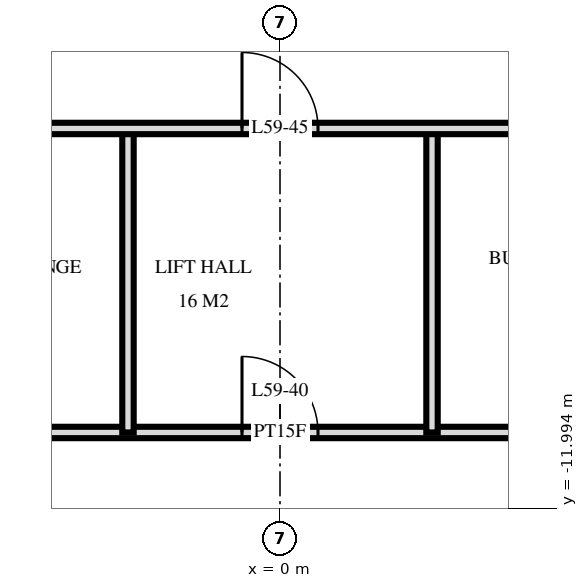
"""IFC4 building model, lengths in metres.
Left out: names, types, materials, properties, quantities, classifications, styles, units other than length and angle.
Written with IfcOpenShell. Run it as: python <this file> out.ifc"""

import sys

from ifc_helpers import new_model, si_unit, direction, frame, frame_2d, origin, place, context, subcontext, project, spatial, rectangle, extrude, element, fill, save


model = new_model("IFC4")
c1 = context("Model", 3, precision=1e-05, world=origin(), true_north=direction((0.0, 1.0)))
c2 = subcontext(c1, "Body", "Model", "MODEL_VIEW")
j1 = project(units=[si_unit("LENGTHUNIT", "METRE"), si_unit("PLANEANGLEUNIT", "RADIAN")], contexts=[c1])
p1 = place(None, origin())
s1 = spatial("IfcSite", under=j1, at=p1, CompositionType="ELEMENT")
p2 = place(p1, origin())
s2 = spatial("IfcBuilding", under=s1, at=p2, CompositionType="ELEMENT")
p3 = place(p2, frame((0.0, 0.0, 225.6)))
s3 = spatial("IfcBuildingStorey", under=s2, at=p3, CompositionType="ELEMENT", Elevation=225.6)
for number, where, z_axis, x_axis in (
    (1, (2.0, -11.0, 0.0), (0.0, 0.0, 1.0), (0.0, 1.0, 0.0)),
    (2, (-2.0, -11.0, 0.0), (0.0, 0.0, 1.0), (0.0, 1.0, 0.0)),
):
    element("IfcWall", number, at=place(p3, frame(where, z_axis=z_axis, x_axis=x_axis)), inside=s3, PredefinedType="PARTITIONING", context=c2, shape_type="SweptSolid", body=[
        extrude(rectangle(XDim=4.0, YDim=0.15, at=frame_2d((2.0, 0.0))), origin(), (0.0, 0.0, 1.0), 3.22),
    ])
p4 = place(p3, frame((-9.95, -11.0, 0.0), z_axis=(0.0, 0.0, 1.0), x_axis=(1.0, 0.0, 0.0)))
e3 = element("IfcWall", 3, at=p4, inside=s3, PredefinedType="PARTITIONING", context=c2, shape_type="SweptSolid", body=[
    extrude(rectangle(XDim=19.9, YDim=0.15, at=frame_2d((9.95, 0.0))), origin(), (0.0, 0.0, 1.0), 3.22),
])
p5 = place(p4, frame((9.45, 0.0, 0.0)))
e4 = element("IfcOpeningElement", 4, at=p5, cuts=e3, PredefinedType="OPENING", context=c2, shape_type="SweptSolid", body=[
    extrude(rectangle(XDim=1.0, YDim=2.1, at=frame_2d((0.5, 1.05))), frame((0.0, 0.085, 0.0), z_axis=(0.0, -1.0, 0.0), x_axis=(1.0, 0.0, 0.0)), (0.0, 0.0, 1.0), 0.17),
])
p6 = place(p4, frame((15.45, 0.0, 0.0)))
e5 = element("IfcOpeningElement", 5, at=p6, cuts=e3, PredefinedType="OPENING", context=c2, shape_type="SweptSolid", body=[
    extrude(rectangle(XDim=1.0, YDim=2.1, at=frame_2d((0.5, 1.05))), frame((0.0, 0.085, 0.0), z_axis=(0.0, -1.0, 0.0), x_axis=(1.0, 0.0, 0.0)), (0.0, 0.0, 1.0), 0.17),
])
p7 = place(p3, frame((-9.95, -7.0, 0.0), z_axis=(0.0, 0.0, 1.0), x_axis=(1.0, 0.0, 0.0)))
e6 = element("IfcWall", 6, at=p7, inside=s3, PredefinedType="PARTITIONING", context=c2, shape_type="SweptSolid", body=[
    extrude(rectangle(XDim=19.9, YDim=0.15, at=frame_2d((9.95, 0.0))), origin(), (0.0, 0.0, 1.0), 3.22),
])
p8 = place(p7, frame((9.45, 0.0, 0.0)))
e7 = element("IfcOpeningElement", 7, at=p8, cuts=e6, PredefinedType="OPENING", context=c2, shape_type="SweptSolid", body=[
    extrude(rectangle(XDim=1.0, YDim=2.1, at=frame_2d((0.5, 1.05))), frame((0.0, 0.085, 0.0), z_axis=(0.0, -1.0, 0.0), x_axis=(1.0, 0.0, 0.0)), (0.0, 0.0, 1.0), 0.17),
])
p9 = place(p7, frame((3.45, 0.0, 0.0)))
e8 = element("IfcOpeningElement", 8, at=p9, cuts=e6, PredefinedType="OPENING", context=c2, shape_type="SweptSolid", body=[
    extrude(rectangle(XDim=1.0, YDim=2.1, at=frame_2d((0.5, 1.05))), frame((0.0, 0.085, 0.0), z_axis=(0.0, -1.0, 0.0), x_axis=(1.0, 0.0, 0.0)), (0.0, 0.0, 1.0), 0.17),
])
p10 = place(p5, origin())
e9 = element("IfcDoor", 9, at=p10, inside=s3, OperationType="SINGLE_SWING_RIGHT", PredefinedType="DOOR", context=c2, shape_type="SweptSolid", body=[
    extrude(rectangle(XDim=1.0, YDim=2.1, at=frame_2d((0.5, 1.05))), frame((0.0, 0.025, 0.0), z_axis=(0.0, -1.0, 0.0), x_axis=(1.0, 0.0, 0.0)), (0.0, 0.0, 1.0), 0.05),
])
fill(e4, e9)
p11 = place(p8, origin())
e10 = element("IfcDoor", 10, at=p11, inside=s3, OperationType="SINGLE_SWING_RIGHT", PredefinedType="DOOR", context=c2, shape_type="SweptSolid", body=[
    extrude(rectangle(XDim=1.0, YDim=2.1, at=frame_2d((0.5, 1.05))), frame((0.0, 0.025, 0.0), z_axis=(0.0, -1.0, 0.0), x_axis=(1.0, 0.0, 0.0)), (0.0, 0.0, 1.0), 0.05),
])
fill(e7, e10)
save(model, sys.argv[1])
